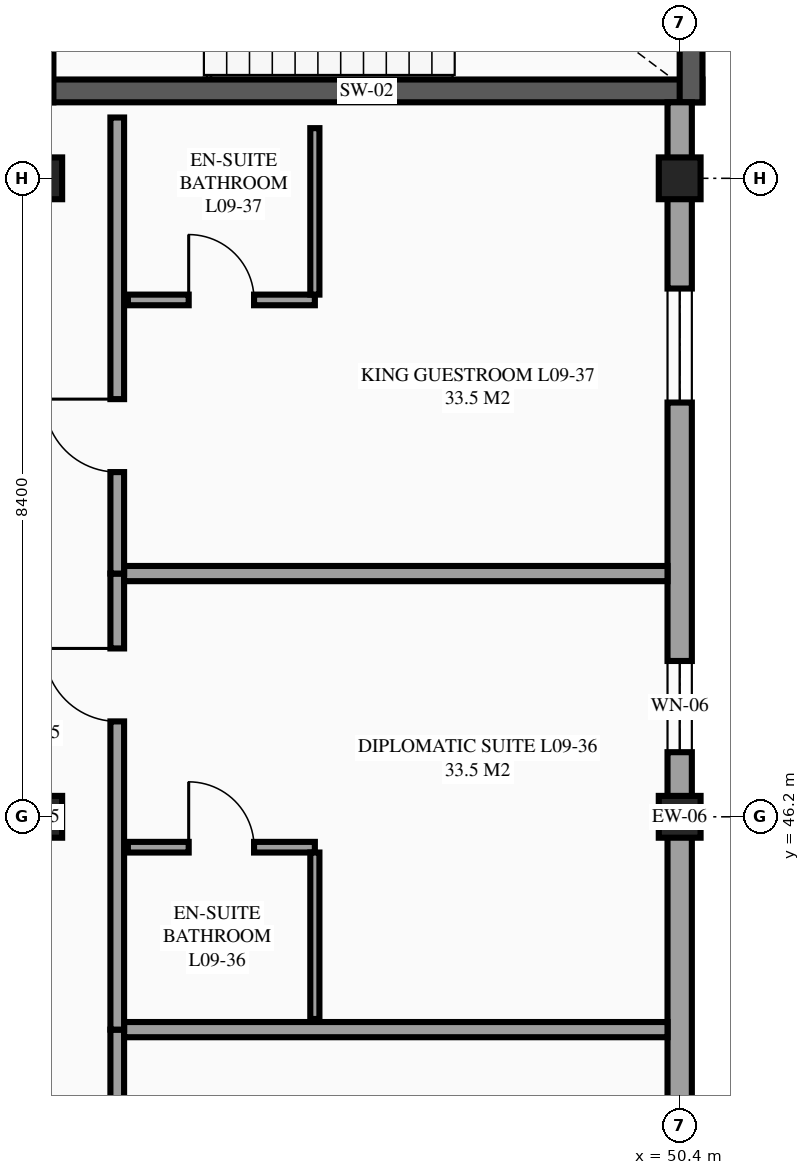
"""IFC4 building model, lengths in metres.
Left out: names, types, materials, properties, quantities, classifications, styles, units other than length and angle.
Written with IfcOpenShell. Run it as: python <this file> out.ifc"""

import sys

from ifc_helpers import new_model, si_unit, direction, frame, frame_2d, origin, origin_2d, place, context, subcontext, project, spatial, rectangle, extrude, element, fill, save


model = new_model("IFC4")
c1 = context("Model", 3, precision=1e-05, world=origin(), true_north=direction((0.0, 1.0)))
c2 = subcontext(c1, "Body", "Model", "MODEL_VIEW")
j1 = project(units=[si_unit("LENGTHUNIT", "METRE"), si_unit("PLANEANGLEUNIT", "RADIAN")], contexts=[c1])
p1 = place(None, origin())
s1 = spatial("IfcSite", under=j1, at=p1, CompositionType="ELEMENT")
p2 = place(p1, origin())
s2 = spatial("IfcBuilding", under=s1, at=p2, CompositionType="ELEMENT")
p3 = place(p2, frame((0.0, 0.0, 36.3)))
s3 = spatial("IfcBuildingStorey", under=s2, at=p3, CompositionType="ELEMENT", Elevation=36.3)
for number, where, z_axis, x_axis in (
    (1, (42.0, 46.2, 0.0), (0.0, 0.0, 1.0), (1.0, 0.0, 0.0)),
    (2, (42.0, 54.6, 0.0), (0.0, 0.0, 1.0), (1.0, 0.0, 0.0)),
    (3, (50.4, 46.2, 0.0), (0.0, 0.0, 1.0), (1.0, 0.0, 0.0)),
    (4, (50.4, 54.6, 0.0), (0.0, 0.0, 1.0), (1.0, 0.0, 0.0)),
):
    element("IfcColumn", number, at=place(p3, frame(where, z_axis=z_axis, x_axis=x_axis)), inside=s3, PredefinedType="COLUMN", context=c2, shape_type="SweptSolid", body=[
        extrude(rectangle(XDim=0.55, YDim=0.55, at=origin_2d()), origin(), (0.0, 0.0, 1.0), 3.6),
    ])
p4 = place(p3, frame((50.4, 37.8, 0.0), z_axis=(0.0, 0.0, 1.0), x_axis=(0.0, 1.0, 0.0)))
e5 = element("IfcWall", 5, at=p4, inside=s3, PredefinedType="STANDARD", context=c2, shape_type="SweptSolid", body=[
    extrude(rectangle(XDim=16.8, YDim=0.32, at=frame_2d((8.4, 0.0))), origin(), (0.0, 0.0, 1.0), 2.48),
])
p5 = place(p4, frame((1.85, 0.0, 0.85)))
e6 = element("IfcOpeningElement", 6, at=p5, cuts=e5, PredefinedType="OPENING", context=c2, shape_type="SweptSolid", body=[
    extrude(rectangle(XDim=1.5, YDim=1.5, at=frame_2d((0.75, 0.75))), frame((0.0, 0.17, 0.0), z_axis=(0.0, -1.0, 0.0), x_axis=(1.0, 0.0, 0.0)), (0.0, 0.0, 1.0), 0.34),
])
p6 = place(p4, frame((9.25, 0.0, 0.85)))
e7 = element("IfcOpeningElement", 7, at=p6, cuts=e5, PredefinedType="OPENING", context=c2, shape_type="SweptSolid", body=[
    extrude(rectangle(XDim=1.2, YDim=1.5, at=frame_2d((0.6, 0.75))), frame((0.0, 0.17, 0.0), z_axis=(0.0, -1.0, 0.0), x_axis=(1.0, 0.0, 0.0)), (0.0, 0.0, 1.0), 0.34),
])
p7 = place(p4, frame((13.85, 0.0, 0.85)))
e8 = element("IfcOpeningElement", 8, at=p7, cuts=e5, PredefinedType="OPENING", context=c2, shape_type="SweptSolid", body=[
    extrude(rectangle(XDim=1.5, YDim=1.5, at=frame_2d((0.75, 0.75))), frame((0.0, 0.17, 0.0), z_axis=(0.0, -1.0, 0.0), x_axis=(1.0, 0.0, 0.0)), (0.0, 0.0, 1.0), 0.34),
])
p8 = place(p3, frame((41.86, 55.75, 0.0), z_axis=(0.0, 0.0, 1.0), x_axis=(1.0, 0.0, 0.0)))
e9 = element("IfcWall", 9, at=p8, inside=s3, PredefinedType="SHEAR", context=c2, shape_type="SweptSolid", body=[
    extrude(rectangle(XDim=8.84, YDim=0.3, at=frame_2d((4.42, 0.0))), origin(), (0.0, 0.0, 1.0), 3.6),
])
p9 = place(p3, frame((50.55, 55.6, 0.0), z_axis=(0.0, 0.0, 1.0), x_axis=(0.0, 1.0, 0.0)))
e10 = element("IfcWall", 10, at=p9, inside=s3, PredefinedType="SHEAR", context=c2, shape_type="SweptSolid", body=[
    extrude(rectangle(XDim=5.2, YDim=0.3, at=frame_2d((2.6, 0.0))), origin(), (0.0, 0.0, 1.0), 3.6),
])
p10 = place(p3, frame((42.01, 60.8, 0.0), z_axis=(0.0, 0.0, 1.0), x_axis=(0.0, -1.0, 0.0)))
e11 = element("IfcWall", 11, at=p10, inside=s3, PredefinedType="SHEAR", context=c2, shape_type="SweptSolid", body=[
    extrude(rectangle(XDim=5.2, YDim=0.3, at=frame_2d((2.6, 0.0))), origin(), (0.0, 0.0, 1.0), 3.6),
])
p11 = place(p10, frame((3.0, 0.0, 0.0)))
e12 = element("IfcOpeningElement", 12, at=p11, cuts=e11, PredefinedType="OPENING", context=c2, shape_type="SweptSolid", body=[
    extrude(rectangle(XDim=1.15, YDim=2.15, at=frame_2d((0.575, 1.075))), frame((0.0, 0.16, 0.0), z_axis=(0.0, -1.0, 0.0), x_axis=(1.0, 0.0, 0.0)), (0.0, 0.0, 1.0), 0.32),
])
p12 = place(p3, frame((43.0, 37.4, 0.0), z_axis=(0.0, 0.0, 1.0), x_axis=(0.0, 1.0, 0.0)))
e13 = element("IfcWall", 13, at=p12, inside=s3, PredefinedType="PARTITIONING", context=c2, shape_type="SweptSolid", body=[
    extrude(rectangle(XDim=6.0, YDim=0.18, at=frame_2d((3.0, 0.0))), origin(), (0.0, 0.0, 1.0), 3.375),
])
p13 = place(p12, frame((3.705, 0.0, 0.0)))
e14 = element("IfcOpeningElement", 14, at=p13, cuts=e13, PredefinedType="OPENING", context=c2, shape_type="SweptSolid", body=[
    extrude(rectangle(XDim=0.96, YDim=2.15, at=frame_2d((0.48, 1.075))), frame((0.0, 0.1, 0.0), z_axis=(0.0, -1.0, 0.0), x_axis=(1.0, 0.0, 0.0)), (0.0, 0.0, 1.0), 0.2),
])
p14 = place(p3, frame((43.09, 43.4, 0.0), z_axis=(0.0, 0.0, 1.0), x_axis=(1.0, 0.0, 0.0)))
e15 = element("IfcWall", 15, at=p14, inside=s3, PredefinedType="PARTITIONING", context=c2, shape_type="SweptSolid", body=[
    extrude(rectangle(XDim=7.15, YDim=0.2, at=frame_2d((3.575, 0.0))), origin(), (0.0, 0.0, 1.0), 3.375),
])
p15 = place(p3, frame((43.0, 43.4, 0.0), z_axis=(0.0, 0.0, 1.0), x_axis=(0.0, 1.0, 0.0)))
e16 = element("IfcWall", 16, at=p15, inside=s3, PredefinedType="PARTITIONING", context=c2, shape_type="SweptSolid", body=[
    extrude(rectangle(XDim=6.0, YDim=0.18, at=frame_2d((3.0, 0.0))), origin(), (0.0, 0.0, 1.0), 3.375),
])
p16 = place(p15, frame((4.055, 0.0, 0.0)))
e17 = element("IfcOpeningElement", 17, at=p16, cuts=e16, PredefinedType="OPENING", context=c2, shape_type="SweptSolid", body=[
    extrude(rectangle(XDim=0.96, YDim=2.15, at=frame_2d((0.48, 1.075))), frame((0.0, 0.1, 0.0), z_axis=(0.0, -1.0, 0.0), x_axis=(1.0, 0.0, 0.0)), (0.0, 0.0, 1.0), 0.2),
])
p17 = place(p3, frame((43.09, 49.4, 0.0), z_axis=(0.0, 0.0, 1.0), x_axis=(1.0, 0.0, 0.0)))
e18 = element("IfcWall", 18, at=p17, inside=s3, PredefinedType="PARTITIONING", context=c2, shape_type="SweptSolid", body=[
    extrude(rectangle(XDim=7.15, YDim=0.2, at=frame_2d((3.575, 0.0))), origin(), (0.0, 0.0, 1.0), 3.375),
])
p18 = place(p3, frame((43.14, 45.8, 0.0), z_axis=(0.0, 0.0, 1.0), x_axis=(1.0, 0.0, 0.0)))
e19 = element("IfcWall", 19, at=p18, inside=s3, PredefinedType="PARTITIONING", context=c2, shape_type="SweptSolid", body=[
    extrude(rectangle(XDim=2.46, YDim=0.14, at=frame_2d((1.23, 0.0))), origin(), (0.0, 0.0, 1.0), 3.375),
])
p19 = place(p18, frame((0.8, 0.0, 0.0)))
e20 = element("IfcOpeningElement", 20, at=p19, cuts=e19, PredefinedType="OPENING", context=c2, shape_type="SweptSolid", body=[
    extrude(rectangle(XDim=0.86, YDim=2.1, at=frame_2d((0.43, 1.05))), frame((0.0, 0.08, 0.0), z_axis=(0.0, -1.0, 0.0), x_axis=(1.0, 0.0, 0.0)), (0.0, 0.0, 1.0), 0.16),
])
p20 = place(p3, frame((45.6, 43.54, 0.0), z_axis=(0.0, 0.0, 1.0), x_axis=(0.0, 1.0, 0.0)))
e21 = element("IfcWall", 21, at=p20, inside=s3, PredefinedType="PARTITIONING", context=c2, shape_type="SweptSolid", body=[
    extrude(rectangle(XDim=2.19, YDim=0.12, at=frame_2d((1.095, 0.0))), origin(), (0.0, 0.0, 1.0), 3.375),
])
p21 = place(p3, frame((43.0, 49.4, 0.0), z_axis=(0.0, 0.0, 1.0), x_axis=(0.0, 1.0, 0.0)))
e22 = element("IfcWall", 22, at=p21, inside=s3, PredefinedType="PARTITIONING", context=c2, shape_type="SweptSolid", body=[
    extrude(rectangle(XDim=6.0, YDim=0.18, at=frame_2d((3.0, 0.0))), origin(), (0.0, 0.0, 1.0), 3.375),
])
p22 = place(p21, frame((1.335, 0.0, 0.0)))
e23 = element("IfcOpeningElement", 23, at=p22, cuts=e22, PredefinedType="OPENING", context=c2, shape_type="SweptSolid", body=[
    extrude(rectangle(XDim=0.96, YDim=2.15, at=frame_2d((0.48, 1.075))), frame((0.0, 0.1, 0.0), z_axis=(0.0, -1.0, 0.0), x_axis=(1.0, 0.0, 0.0)), (0.0, 0.0, 1.0), 0.2),
])
p23 = place(p3, frame((43.14, 53.0, 0.0), z_axis=(0.0, 0.0, 1.0), x_axis=(1.0, 0.0, 0.0)))
e24 = element("IfcWall", 24, at=p23, inside=s3, PredefinedType="PARTITIONING", context=c2, shape_type="SweptSolid", body=[
    extrude(rectangle(XDim=2.46, YDim=0.14, at=frame_2d((1.23, 0.0))), origin(), (0.0, 0.0, 1.0), 3.375),
])
p24 = place(p23, frame((0.8, 0.0, 0.0)))
e25 = element("IfcOpeningElement", 25, at=p24, cuts=e24, PredefinedType="OPENING", context=c2, shape_type="SweptSolid", body=[
    extrude(rectangle(XDim=0.86, YDim=2.1, at=frame_2d((0.43, 1.05))), frame((0.0, 0.08, 0.0), z_axis=(0.0, -1.0, 0.0), x_axis=(1.0, 0.0, 0.0)), (0.0, 0.0, 1.0), 0.16),
])
p25 = place(p3, frame((45.6, 53.07, 0.0), z_axis=(0.0, 0.0, 1.0), x_axis=(0.0, 1.0, 0.0)))
e26 = element("IfcWall", 26, at=p25, inside=s3, PredefinedType="PARTITIONING", context=c2, shape_type="SweptSolid", body=[
    extrude(rectangle(XDim=2.19, YDim=0.12, at=frame_2d((1.095, 0.0))), origin(), (0.0, 0.0, 1.0), 3.375),
])
p26 = place(p3, frame((50.4, 54.6, 0.0), z_axis=(0.0, 0.0, 1.0), x_axis=(0.0, 1.0, 0.0)))
e27 = element("IfcWall", 27, at=p26, inside=s3, PredefinedType="STANDARD", context=c2, shape_type="SweptSolid", body=[
    extrude(rectangle(XDim=1.0, YDim=0.32, at=frame_2d((0.5, 0.0))), origin(), (0.0, 0.0, 1.0), 2.58),
])
p27 = place(p6, origin())
e28 = element("IfcWindow", 28, at=p27, inside=s3, PartitioningType="SINGLE_PANEL", PredefinedType="WINDOW", context=c2, shape_type="SweptSolid", body=[
    extrude(rectangle(XDim=1.2, YDim=1.5, at=frame_2d((0.6, 0.75))), frame((0.0, 0.03, 0.0), z_axis=(0.0, -1.0, 0.0), x_axis=(1.0, 0.0, 0.0)), (0.0, 0.0, 1.0), 0.06),
])
fill(e7, e28)
p28 = place(p7, origin())
e29 = element("IfcWindow", 29, at=p28, inside=s3, PartitioningType="SINGLE_PANEL", PredefinedType="WINDOW", context=c2, shape_type="SweptSolid", body=[
    extrude(rectangle(XDim=1.5, YDim=1.5, at=frame_2d((0.75, 0.75))), frame((0.0, 0.03, 0.0), z_axis=(0.0, -1.0, 0.0), x_axis=(1.0, 0.0, 0.0)), (0.0, 0.0, 1.0), 0.06),
])
fill(e8, e29)
p29 = place(p16, origin())
e30 = element("IfcDoor", 30, at=p29, inside=s3, OperationType="SINGLE_SWING_RIGHT", PredefinedType="DOOR", context=c2, shape_type="SweptSolid", body=[
    extrude(rectangle(XDim=0.96, YDim=2.15, at=frame_2d((0.48, 1.075))), frame((0.0, 0.025, 0.0), z_axis=(0.0, -1.0, 0.0), x_axis=(1.0, 0.0, 0.0)), (0.0, 0.0, 1.0), 0.05),
])
fill(e17, e30)
p30 = place(p19, origin())
e31 = element("IfcDoor", 31, at=p30, inside=s3, OperationType="SINGLE_SWING_LEFT", PredefinedType="DOOR", context=c2, shape_type="SweptSolid", body=[
    extrude(rectangle(XDim=0.86, YDim=2.1, at=frame_2d((0.43, 1.05))), frame((0.0, 0.025, 0.0), z_axis=(0.0, -1.0, 0.0), x_axis=(1.0, 0.0, 0.0)), (0.0, 0.0, 1.0), 0.05),
])
fill(e20, e31)
p31 = place(p22, origin())
e32 = element("IfcDoor", 32, at=p31, inside=s3, OperationType="SINGLE_SWING_RIGHT", PredefinedType="DOOR", context=c2, shape_type="SweptSolid", body=[
    extrude(rectangle(XDim=0.96, YDim=2.15, at=frame_2d((0.48, 1.075))), frame((0.0, 0.025, 0.0), z_axis=(0.0, -1.0, 0.0), x_axis=(1.0, 0.0, 0.0)), (0.0, 0.0, 1.0), 0.05),
])
fill(e23, e32)
p32 = place(p24, origin())
e33 = element("IfcDoor", 33, at=p32, inside=s3, OperationType="SINGLE_SWING_LEFT", PredefinedType="DOOR", context=c2, shape_type="SweptSolid", body=[
    extrude(rectangle(XDim=0.86, YDim=2.1, at=frame_2d((0.43, 1.05))), frame((0.0, 0.025, 0.0), z_axis=(0.0, -1.0, 0.0), x_axis=(1.0, 0.0, 0.0)), (0.0, 0.0, 1.0), 0.05),
])
fill(e25, e33)
save(model, sys.argv[1])
